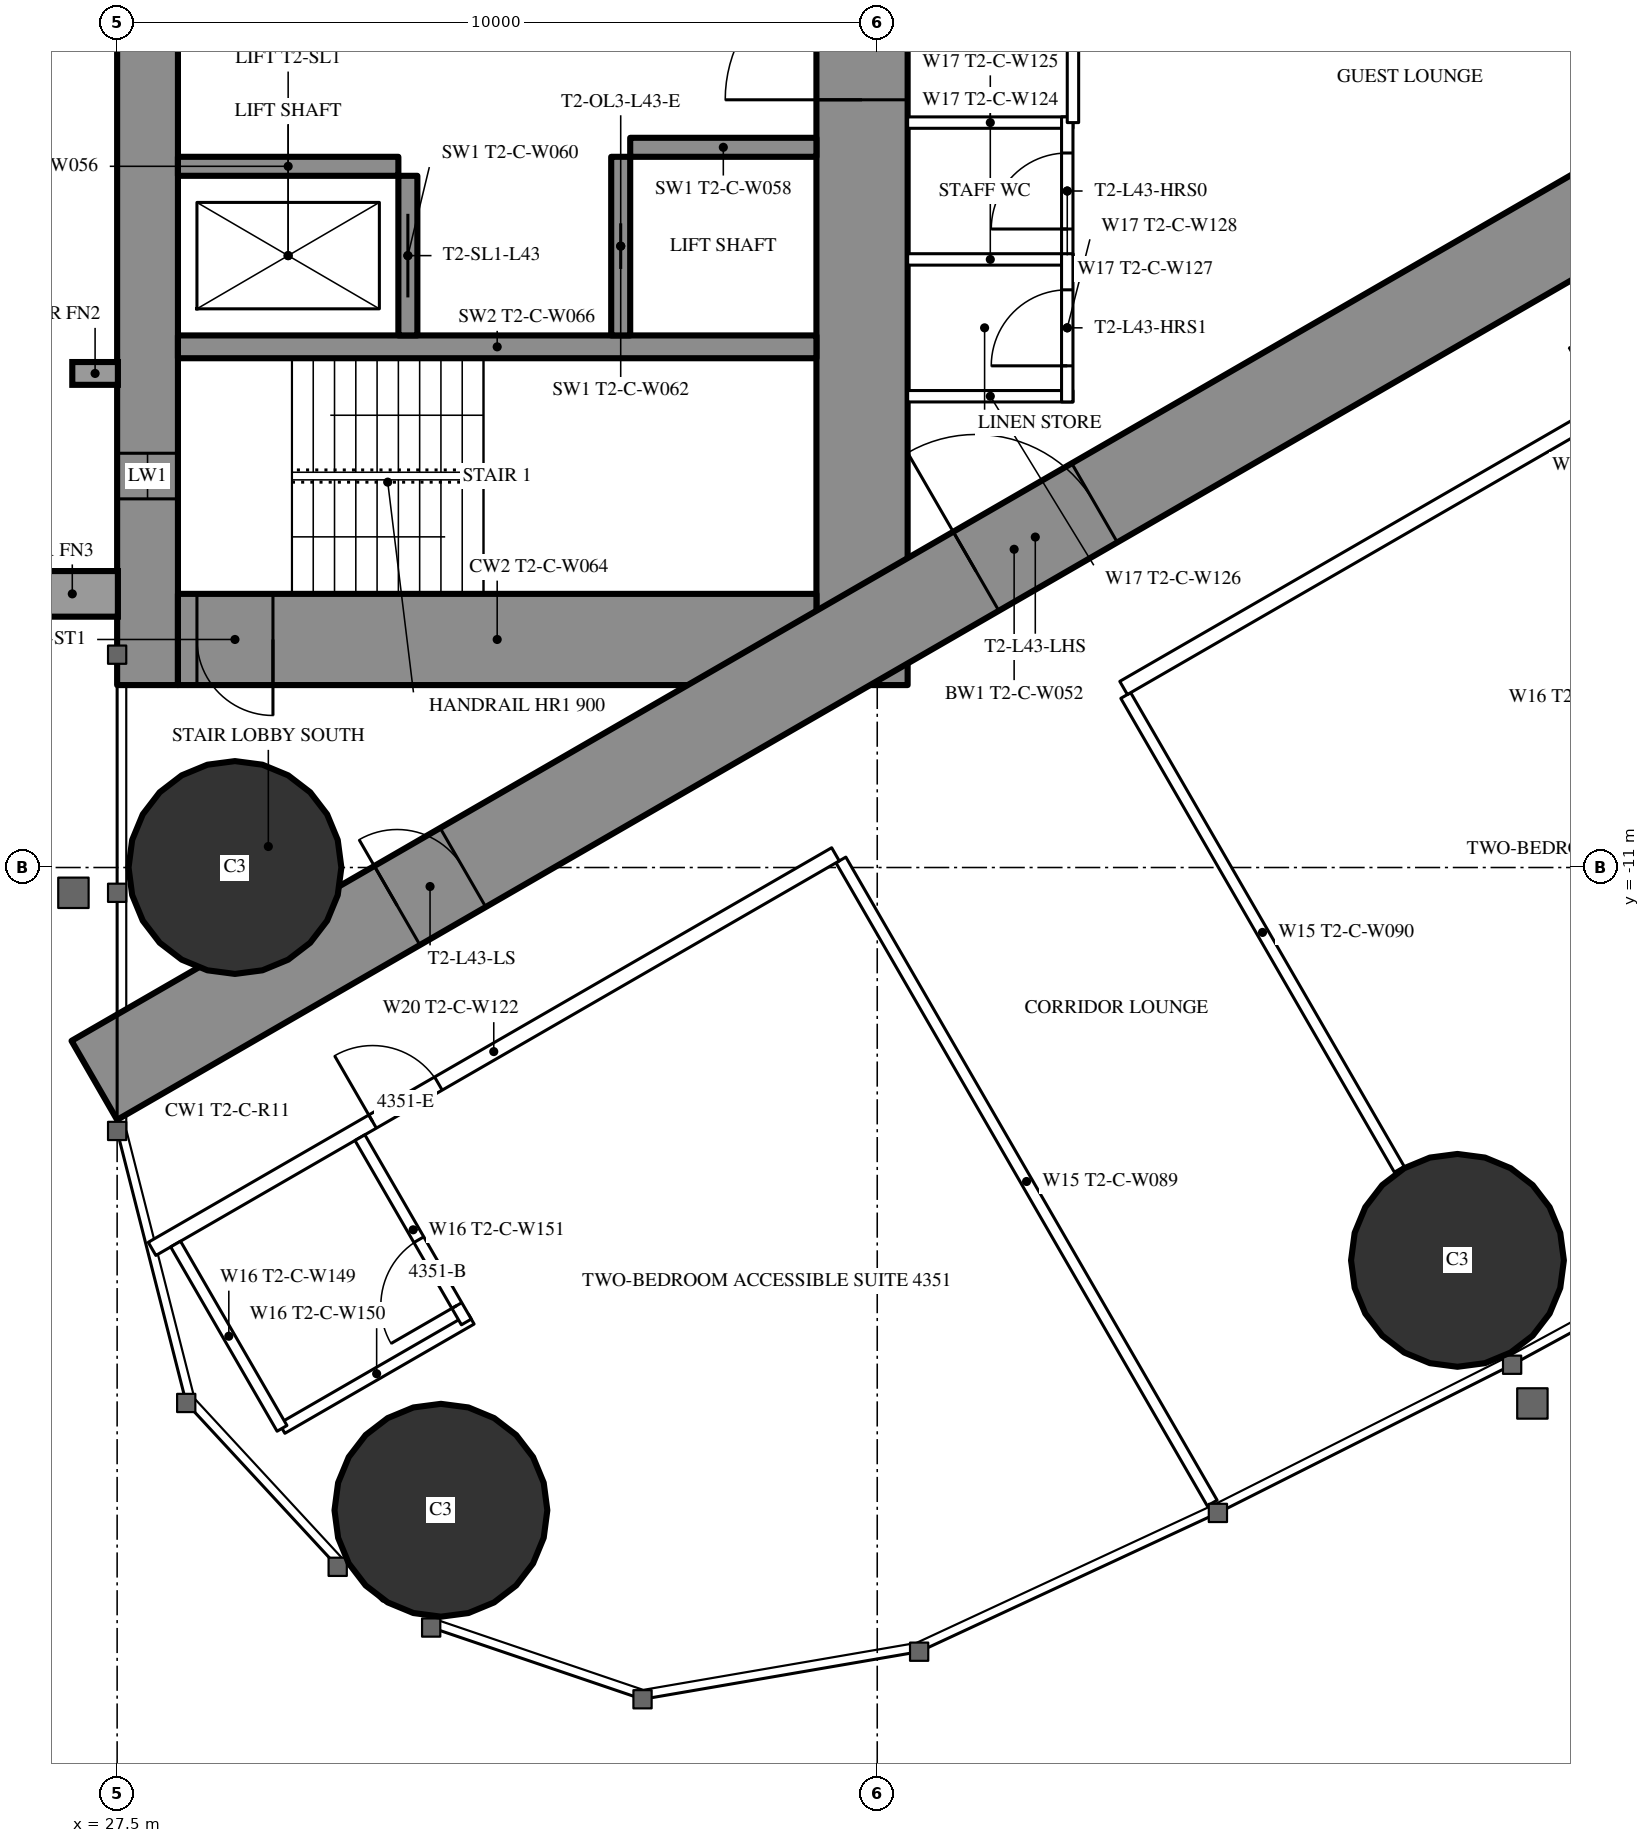
"""IFC4 building model, lengths in metres.
Left out: names, types, materials, properties, quantities, classifications, styles, units other than length and angle.
Written with IfcOpenShell. Run it as: python <this file> out.ifc"""

import sys

from ifc_helpers import new_model, si_unit, direction, frame, frame_2d, origin, origin_2d, place, context, subcontext, project, spatial, rectangle, circle, extrude, element, fill, save


model = new_model("IFC4")
c1 = context("Model", 3, precision=1e-05, world=origin(), true_north=direction((0.0, 1.0)))
c2 = subcontext(c1, "Body", "Model", "MODEL_VIEW")
j1 = project(units=[si_unit("LENGTHUNIT", "METRE"), si_unit("PLANEANGLEUNIT", "RADIAN")], contexts=[c1])
p1 = place(None, origin())
s1 = spatial("IfcSite", under=j1, at=p1, CompositionType="ELEMENT")
p2 = place(p1, origin())
s2 = spatial("IfcBuilding", under=s1, at=p2, CompositionType="ELEMENT")
p3 = place(p2, frame((0.0, 0.0, 163.3)))
s3 = spatial("IfcBuildingStorey", under=s2, at=p3, CompositionType="ELEMENT", Elevation=163.3)
for number, where, z_axis, x_axis in (
    (1, (31.76, -19.456, 0.0), (0.0, 0.0, 1.0), (1.0, 0.0, 0.0)),
    (2, (29.05, -11.0, 0.0), (0.0, 0.0, 1.0), (1.0, 0.0, 0.0)),
    (3, (45.134, -16.168, 0.0), (0.0, 0.0, 1.0), (1.0, 0.0, 0.0)),
):
    element("IfcColumn", number, at=place(p3, frame(where, z_axis=z_axis, x_axis=x_axis)), inside=s3, PredefinedType="COLUMN", context=c2, shape_type="SweptSolid", body=[
        extrude(circle(Radius=1.4, at=origin_2d()), origin(), (0.0, 0.0, 1.0), 3.5),
    ])
p4 = place(p3, frame((27.9, -8.6, 0.0), z_axis=(0.0, 0.0, 1.0), x_axis=(0.0, 1.0, 0.0)))
e4 = element("IfcWall", 4, at=p4, inside=s3, PredefinedType="SHEAR", context=c2, shape_type="SweptSolid", body=[
    extrude(rectangle(XDim=17.2, YDim=0.8, at=frame_2d((8.6, 0.0))), origin(), (0.0, 0.0, 1.0), 3.5),
])
p5 = place(p4, frame((2.45, 0.0, 0.6)))
e5 = element("IfcOpeningElement", 5, at=p5, cuts=e4, PredefinedType="OPENING", context=c2, shape_type="SweptSolid", body=[
    extrude(rectangle(XDim=0.6, YDim=2.1, at=frame_2d((0.3, 1.05))), frame((0.0, 0.41, 0.0), z_axis=(0.0, -1.0, 0.0), x_axis=(1.0, 0.0, 0.0)), (0.0, 0.0, 1.0), 0.82),
])
p6 = place(p4, frame((14.15, 0.0, 0.6)))
e6 = element("IfcOpeningElement", 6, at=p6, cuts=e4, PredefinedType="OPENING", context=c2, shape_type="SweptSolid", body=[
    extrude(rectangle(XDim=0.6, YDim=2.1, at=frame_2d((0.3, 1.05))), frame((0.0, 0.41, 0.0), z_axis=(0.0, -1.0, 0.0), x_axis=(1.0, 0.0, 0.0)), (0.0, 0.0, 1.0), 0.82),
])
p7 = place(p3, frame((37.3, -8.6, 0.0), z_axis=(0.0, 0.0, 1.0), x_axis=(0.0, 1.0, 0.0)))
e7 = element("IfcWall", 7, at=p7, inside=s3, PredefinedType="SHEAR", context=c2, shape_type="SweptSolid", body=[
    extrude(rectangle(XDim=17.2, YDim=1.2, at=frame_2d((8.6, 0.0))), origin(), (0.0, 0.0, 1.0), 3.5),
])
p8 = place(p7, frame((7.7, 0.0, 0.0)))
e8 = element("IfcOpeningElement", 8, at=p8, cuts=e7, PredefinedType="OPENING", context=c2, shape_type="SweptSolid", body=[
    extrude(rectangle(XDim=1.8, YDim=2.2, at=frame_2d((0.9, 1.1))), frame((0.0, 0.61, 0.0), z_axis=(0.0, -1.0, 0.0), x_axis=(1.0, 0.0, 0.0)), (0.0, 0.0, 1.0), 1.22),
])
p9 = place(p3, frame((28.3, -8.0, 0.0), z_axis=(0.0, 0.0, 1.0), x_axis=(1.0, 0.0, 0.0)))
e9 = element("IfcWall", 9, at=p9, inside=s3, PredefinedType="SHEAR", context=c2, shape_type="SweptSolid", body=[
    extrude(rectangle(XDim=8.4, YDim=1.2, at=frame_2d((4.2, 0.0))), origin(), (0.0, 0.0, 1.0), 3.5),
])
p10 = place(p9, frame((0.25, 0.0, 0.0)))
e10 = element("IfcOpeningElement", 10, at=p10, cuts=e9, PredefinedType="OPENING", context=c2, shape_type="SweptSolid", body=[
    extrude(rectangle(XDim=1.0, YDim=2.2, at=frame_2d((0.5, 1.1))), frame((0.0, 0.61, 0.0), z_axis=(0.0, -1.0, 0.0), x_axis=(1.0, 0.0, 0.0)), (0.0, 0.0, 1.0), 1.22),
])
p11 = place(p3, frame((28.3, -4.15, 0.0), z_axis=(0.0, 0.0, 1.0), x_axis=(1.0, 0.0, 0.0)))
e11 = element("IfcWall", 11, at=p11, inside=s3, PredefinedType="SHEAR", context=c2, shape_type="SweptSolid", body=[
    extrude(rectangle(XDim=8.4, YDim=0.3, at=frame_2d((4.2, 0.0))), origin(), (0.0, 0.0, 1.0), 3.5),
])
p12 = place(p3, frame((31.325, -4.0, 0.0), z_axis=(0.0, 0.0, 1.0), x_axis=(0.0, 1.0, 0.0)))
e12 = element("IfcWall", 12, at=p12, inside=s3, PredefinedType="SHEAR", context=c2, shape_type="SweptSolid", body=[
    extrude(rectangle(XDim=2.1, YDim=0.25, at=frame_2d((1.05, 0.0))), origin(), (0.0, 0.0, 1.0), 3.5),
])
p13 = place(p12, frame((0.5, 0.0, 0.0)))
e13 = element("IfcOpeningElement", 13, at=p13, cuts=e12, PredefinedType="OPENING", context=c2, shape_type="SweptSolid", body=[
    extrude(rectangle(XDim=1.1, YDim=2.2, at=frame_2d((0.55, 1.1))), frame((0.0, 0.135, 0.0), z_axis=(0.0, -1.0, 0.0), x_axis=(1.0, 0.0, 0.0)), (0.0, 0.0, 1.0), 0.27),
])
p14 = place(p3, frame((34.125, -4.0, 0.0), z_axis=(0.0, 0.0, 1.0), x_axis=(0.0, 1.0, 0.0)))
e14 = element("IfcWall", 14, at=p14, inside=s3, PredefinedType="SHEAR", context=c2, shape_type="SweptSolid", body=[
    extrude(rectangle(XDim=2.35, YDim=0.25, at=frame_2d((1.175, 0.0))), origin(), (0.0, 0.0, 1.0), 3.5),
])
p15 = place(p14, frame((0.875, 0.0, 0.0)))
e15 = element("IfcOpeningElement", 15, at=p15, cuts=e14, PredefinedType="OPENING", context=c2, shape_type="SweptSolid", body=[
    extrude(rectangle(XDim=0.6, YDim=2.0, at=frame_2d((0.3, 1.0))), frame((0.0, 0.135, 0.0), z_axis=(0.0, -1.0, 0.0), x_axis=(1.0, 0.0, 0.0)), (0.0, 0.0, 1.0), 0.27),
])
p16 = place(p3, frame((28.3, -1.775, 0.0), z_axis=(0.0, 0.0, 1.0), x_axis=(1.0, 0.0, 0.0)))
e16 = element("IfcWall", 16, at=p16, inside=s3, PredefinedType="SHEAR", context=c2, shape_type="SweptSolid", body=[
    extrude(rectangle(XDim=2.9, YDim=0.25, at=frame_2d((1.45, 0.0))), origin(), (0.0, 0.0, 1.0), 3.5),
])
p17 = place(p3, frame((34.25, -1.525, 0.0), z_axis=(0.0, 0.0, 1.0), x_axis=(1.0, 0.0, 0.0)))
e17 = element("IfcWall", 17, at=p17, inside=s3, PredefinedType="SHEAR", context=c2, shape_type="SweptSolid", body=[
    extrude(rectangle(XDim=2.45, YDim=0.25, at=frame_2d((1.225, 0.0))), origin(), (0.0, 0.0, 1.0), 3.5),
])
p18 = place(p3, frame((27.2, -13.8, 0.0), z_axis=(0.0, 0.0, 1.0), x_axis=(0.866027159892, 0.499996958321, 0.0)))
e18 = element("IfcWall", 18, at=p18, inside=s3, PredefinedType="SHEAR", context=c2, shape_type="SweptSolid", body=[
    extrude(rectangle(XDim=27.947, YDim=1.2, at=frame_2d((13.973, 0.0))), origin(), (0.0, 0.0, 1.0), 3.5),
])
p19 = place(p18, frame((4.6, 0.0, 0.0)))
e19 = element("IfcOpeningElement", 19, at=p19, cuts=e18, PredefinedType="OPENING", context=c2, shape_type="SweptSolid", body=[
    extrude(rectangle(XDim=1.0, YDim=2.2, at=frame_2d((0.5, 1.1))), frame((0.0, 0.61, 0.0), z_axis=(0.0, -1.0, 0.0), x_axis=(1.0, 0.0, 0.0)), (0.0, 0.0, 1.0), 1.22),
])
p20 = place(p18, frame((13.395, 0.0, 0.0)))
e20 = element("IfcOpeningElement", 20, at=p20, cuts=e18, PredefinedType="OPENING", context=c2, shape_type="SweptSolid", body=[
    extrude(rectangle(XDim=1.8, YDim=2.2, at=frame_2d((0.9, 1.1))), frame((0.0, 0.61, 0.0), z_axis=(0.0, -1.0, 0.0), x_axis=(1.0, 0.0, 0.0)), (0.0, 0.0, 1.0), 1.22),
])
p21 = place(p3, frame((37.022, -10.9, 0.0), z_axis=(0.0, 0.0, 1.0), x_axis=(0.499998620953, -0.866026199976, 0.0)))
e21 = element("IfcWall", 21, at=p21, inside=s3, PredefinedType="PARTITIONING", context=c2, shape_type="SweptSolid", body=[
    extrude(rectangle(XDim=9.77, YDim=0.15, at=frame_2d((4.885, 0.0))), origin(), (0.0, 0.0, 1.0), 3.25),
])
p22 = place(p3, frame((40.769, -8.737, 0.0), z_axis=(0.0, 0.0, 1.0), x_axis=(0.500013115284, -0.866017831539, 0.0)))
e22 = element("IfcWall", 22, at=p22, inside=s3, PredefinedType="PARTITIONING", context=c2, shape_type="SweptSolid", body=[
    extrude(rectangle(XDim=7.198, YDim=0.15, at=frame_2d((3.599, 0.0))), origin(), (0.0, 0.0, 1.0), 2.3),
])
p23 = place(p3, frame((27.959, -16.017, 0.0), z_axis=(0.0, 0.0, 1.0), x_axis=(0.866026201739, 0.499998617899, 0.0)))
e23 = element("IfcWall", 23, at=p23, inside=s3, PredefinedType="PARTITIONING", context=c2, shape_type="SweptSolid", body=[
    extrude(rectangle(XDim=10.382, YDim=0.2, at=frame_2d((5.191, 0.0))), origin(), (0.0, 0.0, 1.0), 3.25),
])
p24 = place(p23, frame((3.35, 0.0, 0.0)))
e24 = element("IfcOpeningElement", 24, at=p24, cuts=e23, PredefinedType="OPENING", context=c2, shape_type="SweptSolid", body=[
    extrude(rectangle(XDim=1.0, YDim=2.2, at=frame_2d((0.5, 1.1))), frame((0.0, 0.11, 0.0), z_axis=(0.0, -1.0, 0.0), x_axis=(1.0, 0.0, 0.0)), (0.0, 0.0, 1.0), 0.22),
])
p25 = place(p3, frame((40.741, -8.638, 0.0), z_axis=(0.0, 0.0, 1.0), x_axis=(0.866022967338, 0.500004220025, 0.0)))
e25 = element("IfcWall", 25, at=p25, inside=s3, PredefinedType="PARTITIONING", context=c2, shape_type="SweptSolid", body=[
    extrude(rectangle(XDim=17.276, YDim=0.2, at=frame_2d((8.638, 0.0))), origin(), (0.0, 0.0, 1.0), 3.25),
])
p26 = place(p25, frame((7.316, 0.0, 0.0)))
e26 = element("IfcOpeningElement", 26, at=p26, cuts=e25, PredefinedType="OPENING", context=c2, shape_type="SweptSolid", body=[
    extrude(rectangle(XDim=0.95, YDim=2.2, at=frame_2d((0.475, 1.1))), frame((0.0, 0.11, 0.0), z_axis=(0.0, -1.0, 0.0), x_axis=(1.0, 0.0, 0.0)), (0.0, 0.0, 1.0), 0.22),
])
p27 = place(p25, frame((11.366, 0.0, 0.0)))
e27 = element("IfcOpeningElement", 27, at=p27, cuts=e25, PredefinedType="OPENING", context=c2, shape_type="SweptSolid", body=[
    extrude(rectangle(XDim=0.95, YDim=2.2, at=frame_2d((0.475, 1.1))), frame((0.0, 0.11, 0.0), z_axis=(0.0, -1.0, 0.0), x_axis=(1.0, 0.0, 0.0)), (0.0, 0.0, 1.0), 0.22),
])
p28 = place(p25, frame((13.347, 0.0, 0.0)))
e28 = element("IfcOpeningElement", 28, at=p28, cuts=e25, PredefinedType="OPENING", context=c2, shape_type="SweptSolid", body=[
    extrude(rectangle(XDim=0.95, YDim=2.2, at=frame_2d((0.475, 1.1))), frame((0.0, 0.11, 0.0), z_axis=(0.0, -1.0, 0.0), x_axis=(1.0, 0.0, 0.0)), (0.0, 0.0, 1.0), 0.22),
])
p29 = place(p3, frame((29.669, -18.379, 0.0), z_axis=(0.0, 0.0, 1.0), x_axis=(0.866039941686, 0.499974818771, 0.0)))
e29 = element("IfcWall", 29, at=p29, inside=s3, PredefinedType="PARTITIONING", context=c2, shape_type="SweptSolid", body=[
    extrude(rectangle(XDim=2.875, YDim=0.15, at=frame_2d((1.438, 0.0))), origin(), (0.0, 0.0, 1.0), 3.25),
])
p30 = place(p3, frame((30.694, -14.554, 0.0), z_axis=(0.0, 0.0, 1.0), x_axis=(0.500049511043, -0.865996816683, 0.0)))
e30 = element("IfcWall", 30, at=p30, inside=s3, PredefinedType="PARTITIONING", context=c2, shape_type="SweptSolid", body=[
    extrude(rectangle(XDim=2.8, YDim=0.15, at=frame_2d((1.4, 0.0))), origin(), (0.0, 0.0, 1.0), 2.3),
])
p31 = place(p30, frame((1.55, 0.0, 0.0)))
e31 = element("IfcOpeningElement", 31, at=p31, cuts=e30, PredefinedType="OPENING", context=c2, shape_type="SweptSolid", body=[
    extrude(rectangle(XDim=1.0, YDim=2.2, at=frame_2d((0.5, 1.1))), frame((0.0, 0.085, 0.0), z_axis=(0.0, -1.0, 0.0), x_axis=(1.0, 0.0, 0.0)), (0.0, 0.0, 1.0), 0.17),
])
p32 = place(p3, frame((28.269, -15.954, 0.0), z_axis=(0.0, 0.0, 1.0), x_axis=(0.49998411664, -0.866034573852, 0.0)))
e32 = element("IfcWall", 32, at=p32, inside=s3, PredefinedType="PARTITIONING", context=c2, shape_type="SweptSolid", body=[
    extrude(rectangle(XDim=2.8, YDim=0.15, at=frame_2d((1.4, 0.0))), origin(), (0.0, 0.0, 1.0), 3.25),
])
for number, where, z_axis, x_axis in (
    (33, (37.9, -1.2, 0.0), (0.0, 0.0, 1.0), (1.0, 0.0, 0.0)),
    (34, (37.9, -3.0, 0.0), (0.0, 0.0, 1.0), (1.0, 0.0, 0.0)),
    (35, (37.9, -4.8, 0.0), (0.0, 0.0, 1.0), (1.0, 0.0, 0.0)),
):
    element("IfcWall", number, at=place(p3, frame(where, z_axis=z_axis, x_axis=x_axis)), inside=s3, PredefinedType="PARTITIONING", context=c2, shape_type="SweptSolid", body=[
        extrude(rectangle(XDim=2.175, YDim=0.15, at=frame_2d((1.087, 0.0))), origin(), (0.0, 0.0, 1.0), 3.25),
    ])
p33 = place(p3, frame((40.0, -3.075, 0.0), z_axis=(0.0, 0.0, 1.0), x_axis=(0.0, 1.0, 0.0)))
e36 = element("IfcWall", 36, at=p33, inside=s3, PredefinedType="PARTITIONING", context=c2, shape_type="SweptSolid", body=[
    extrude(rectangle(XDim=1.95, YDim=0.15, at=frame_2d((0.975, 0.0))), origin(), (0.0, 0.0, 1.0), 3.25),
])
p34 = place(p33, frame((0.475, 0.0, 0.0)))
e37 = element("IfcOpeningElement", 37, at=p34, cuts=e36, PredefinedType="OPENING", context=c2, shape_type="SweptSolid", body=[
    extrude(rectangle(XDim=1.0, YDim=2.2, at=frame_2d((0.5, 1.1))), frame((0.0, 0.085, 0.0), z_axis=(0.0, -1.0, 0.0), x_axis=(1.0, 0.0, 0.0)), (0.0, 0.0, 1.0), 0.17),
])
p35 = place(p3, frame((40.0, -4.875, 0.0), z_axis=(0.0, 0.0, 1.0), x_axis=(0.0, 1.0, 0.0)))
e38 = element("IfcWall", 38, at=p35, inside=s3, PredefinedType="PARTITIONING", context=c2, shape_type="SweptSolid", body=[
    extrude(rectangle(XDim=1.95, YDim=0.15, at=frame_2d((0.975, 0.0))), origin(), (0.0, 0.0, 1.0), 3.25),
])
p36 = place(p35, frame((0.475, 0.0, 0.0)))
e39 = element("IfcOpeningElement", 39, at=p36, cuts=e38, PredefinedType="OPENING", context=c2, shape_type="SweptSolid", body=[
    extrude(rectangle(XDim=1.0, YDim=2.2, at=frame_2d((0.5, 1.1))), frame((0.0, 0.085, 0.0), z_axis=(0.0, -1.0, 0.0), x_axis=(1.0, 0.0, 0.0)), (0.0, 0.0, 1.0), 0.17),
])
p37 = place(p3, frame((40.075, -1.2, 0.0), z_axis=(0.0, 0.0, 1.0), x_axis=(0.0, 1.0, 0.0)))
e40 = element("IfcWall", 40, at=p37, inside=s3, PredefinedType="PARTITIONING", context=c2, shape_type="SweptSolid", body=[
    extrude(rectangle(XDim=6.874, YDim=0.15, at=frame_2d((3.437, 0.0))), origin(), (0.0, 0.0, 1.0), 3.25),
])
p38 = place(p37, frame((2.537, 0.0, 0.0)))
e41 = element("IfcOpeningElement", 41, at=p38, cuts=e40, PredefinedType="OPENING", context=c2, shape_type="SweptSolid", body=[
    extrude(rectangle(XDim=1.8, YDim=2.2, at=frame_2d((0.9, 1.1))), frame((0.0, 0.085, 0.0), z_axis=(0.0, -1.0, 0.0), x_axis=(1.0, 0.0, 0.0)), (0.0, 0.0, 1.0), 0.17),
])
p39 = place(p31, origin())
e42 = element("IfcDoor", 42, at=p39, inside=s3, OperationType="SINGLE_SWING_RIGHT", PredefinedType="DOOR", context=c2, shape_type="SweptSolid", body=[
    extrude(rectangle(XDim=1.0, YDim=2.2, at=frame_2d((0.5, 1.1))), frame((0.0, 0.025, 0.0), z_axis=(0.0, -1.0, 0.0), x_axis=(1.0, 0.0, 0.0)), (0.0, 0.0, 1.0), 0.05),
])
fill(e31, e42)
p40 = place(p24, origin())
e43 = element("IfcDoor", 43, at=p40, inside=s3, OperationType="SINGLE_SWING_LEFT", PredefinedType="DOOR", context=c2, shape_type="SweptSolid", body=[
    extrude(rectangle(XDim=1.0, YDim=2.2, at=frame_2d((0.5, 1.1))), frame((0.0, 0.025, 0.0), z_axis=(0.0, -1.0, 0.0), x_axis=(1.0, 0.0, 0.0)), (0.0, 0.0, 1.0), 0.05),
])
fill(e24, e43)
p41 = place(p34, origin())
e44 = element("IfcDoor", 44, at=p41, inside=s3, OperationType="SINGLE_SWING_LEFT", PredefinedType="DOOR", context=c2, shape_type="SweptSolid", body=[
    extrude(rectangle(XDim=1.0, YDim=2.2, at=frame_2d((0.5, 1.1))), frame((0.0, 0.025, 0.0), z_axis=(0.0, -1.0, 0.0), x_axis=(1.0, 0.0, 0.0)), (0.0, 0.0, 1.0), 0.05),
])
fill(e37, e44)
p42 = place(p36, origin())
e45 = element("IfcDoor", 45, at=p42, inside=s3, OperationType="SINGLE_SWING_LEFT", PredefinedType="DOOR", context=c2, shape_type="SweptSolid", body=[
    extrude(rectangle(XDim=1.0, YDim=2.2, at=frame_2d((0.5, 1.1))), frame((0.0, 0.025, 0.0), z_axis=(0.0, -1.0, 0.0), x_axis=(1.0, 0.0, 0.0)), (0.0, 0.0, 1.0), 0.05),
])
fill(e39, e45)
p43 = place(p19, origin())
e46 = element("IfcDoor", 46, at=p43, inside=s3, OperationType="SINGLE_SWING_LEFT", PredefinedType="DOOR", context=c2, shape_type="SweptSolid", body=[
    extrude(rectangle(XDim=1.0, YDim=2.2, at=frame_2d((0.5, 1.1))), frame((0.0, 0.025, 0.0), z_axis=(0.0, -1.0, 0.0), x_axis=(1.0, 0.0, 0.0)), (0.0, 0.0, 1.0), 0.05),
])
fill(e19, e46)
p44 = place(p20, origin())
e47 = element("IfcDoor", 47, at=p44, inside=s3, OperationType="DOUBLE_DOOR_SINGLE_SWING", PredefinedType="DOOR", context=c2, shape_type="SweptSolid", body=[
    extrude(rectangle(XDim=1.8, YDim=2.2, at=frame_2d((0.9, 1.1))), frame((0.0, 0.025, 0.0), z_axis=(0.0, -1.0, 0.0), x_axis=(1.0, 0.0, 0.0)), (0.0, 0.0, 1.0), 0.05),
])
fill(e20, e47)
p45 = place(p8, origin())
e48 = element("IfcDoor", 48, at=p45, inside=s3, OperationType="DOUBLE_DOOR_SINGLE_SWING", PredefinedType="DOOR", context=c2, shape_type="SweptSolid", body=[
    extrude(rectangle(XDim=1.8, YDim=2.2, at=frame_2d((0.9, 1.1))), frame((0.0, 0.025, 0.0), z_axis=(0.0, -1.0, 0.0), x_axis=(1.0, 0.0, 0.0)), (0.0, 0.0, 1.0), 0.05),
])
fill(e8, e48)
p46 = place(p10, origin())
e49 = element("IfcDoor", 49, at=p46, inside=s3, OperationType="SINGLE_SWING_RIGHT", PredefinedType="DOOR", context=c2, shape_type="SweptSolid", body=[
    extrude(rectangle(XDim=1.0, YDim=2.2, at=frame_2d((0.5, 1.1))), frame((0.0, 0.025, 0.0), z_axis=(0.0, -1.0, 0.0), x_axis=(1.0, 0.0, 0.0)), (0.0, 0.0, 1.0), 0.05),
])
fill(e10, e49)
p47 = place(p13, origin())
e50 = element("IfcDoor", 50, at=p47, inside=s3, OperationType="SLIDING_TO_LEFT", PredefinedType="USERDEFINED", context=c2, shape_type="SweptSolid", body=[
    extrude(rectangle(XDim=1.1, YDim=2.2, at=frame_2d((0.55, 1.1))), frame((0.0, 0.025, 0.0), z_axis=(0.0, -1.0, 0.0), x_axis=(1.0, 0.0, 0.0)), (0.0, 0.0, 1.0), 0.05),
])
fill(e13, e50)
p48 = place(p15, origin())
e51 = element("IfcDoor", 51, at=p48, inside=s3, OperationType="SLIDING_TO_LEFT", PredefinedType="DOOR", context=c2, shape_type="SweptSolid", body=[
    extrude(rectangle(XDim=0.6, YDim=2.0, at=frame_2d((0.3, 1.0))), frame((0.0, 0.025, 0.0), z_axis=(0.0, -1.0, 0.0), x_axis=(1.0, 0.0, 0.0)), (0.0, 0.0, 1.0), 0.05),
])
fill(e15, e51)
p49 = place(p5, origin())
e52 = element("IfcWindow", 52, at=p49, inside=s3, PartitioningType="SINGLE_PANEL", PredefinedType="WINDOW", context=c2, shape_type="SweptSolid", body=[
    extrude(rectangle(XDim=0.6, YDim=2.1, at=frame_2d((0.3, 1.05))), frame((0.0, 0.03, 0.0), z_axis=(0.0, -1.0, 0.0), x_axis=(1.0, 0.0, 0.0)), (0.0, 0.0, 1.0), 0.06),
])
fill(e5, e52)
save(model, sys.argv[1])
